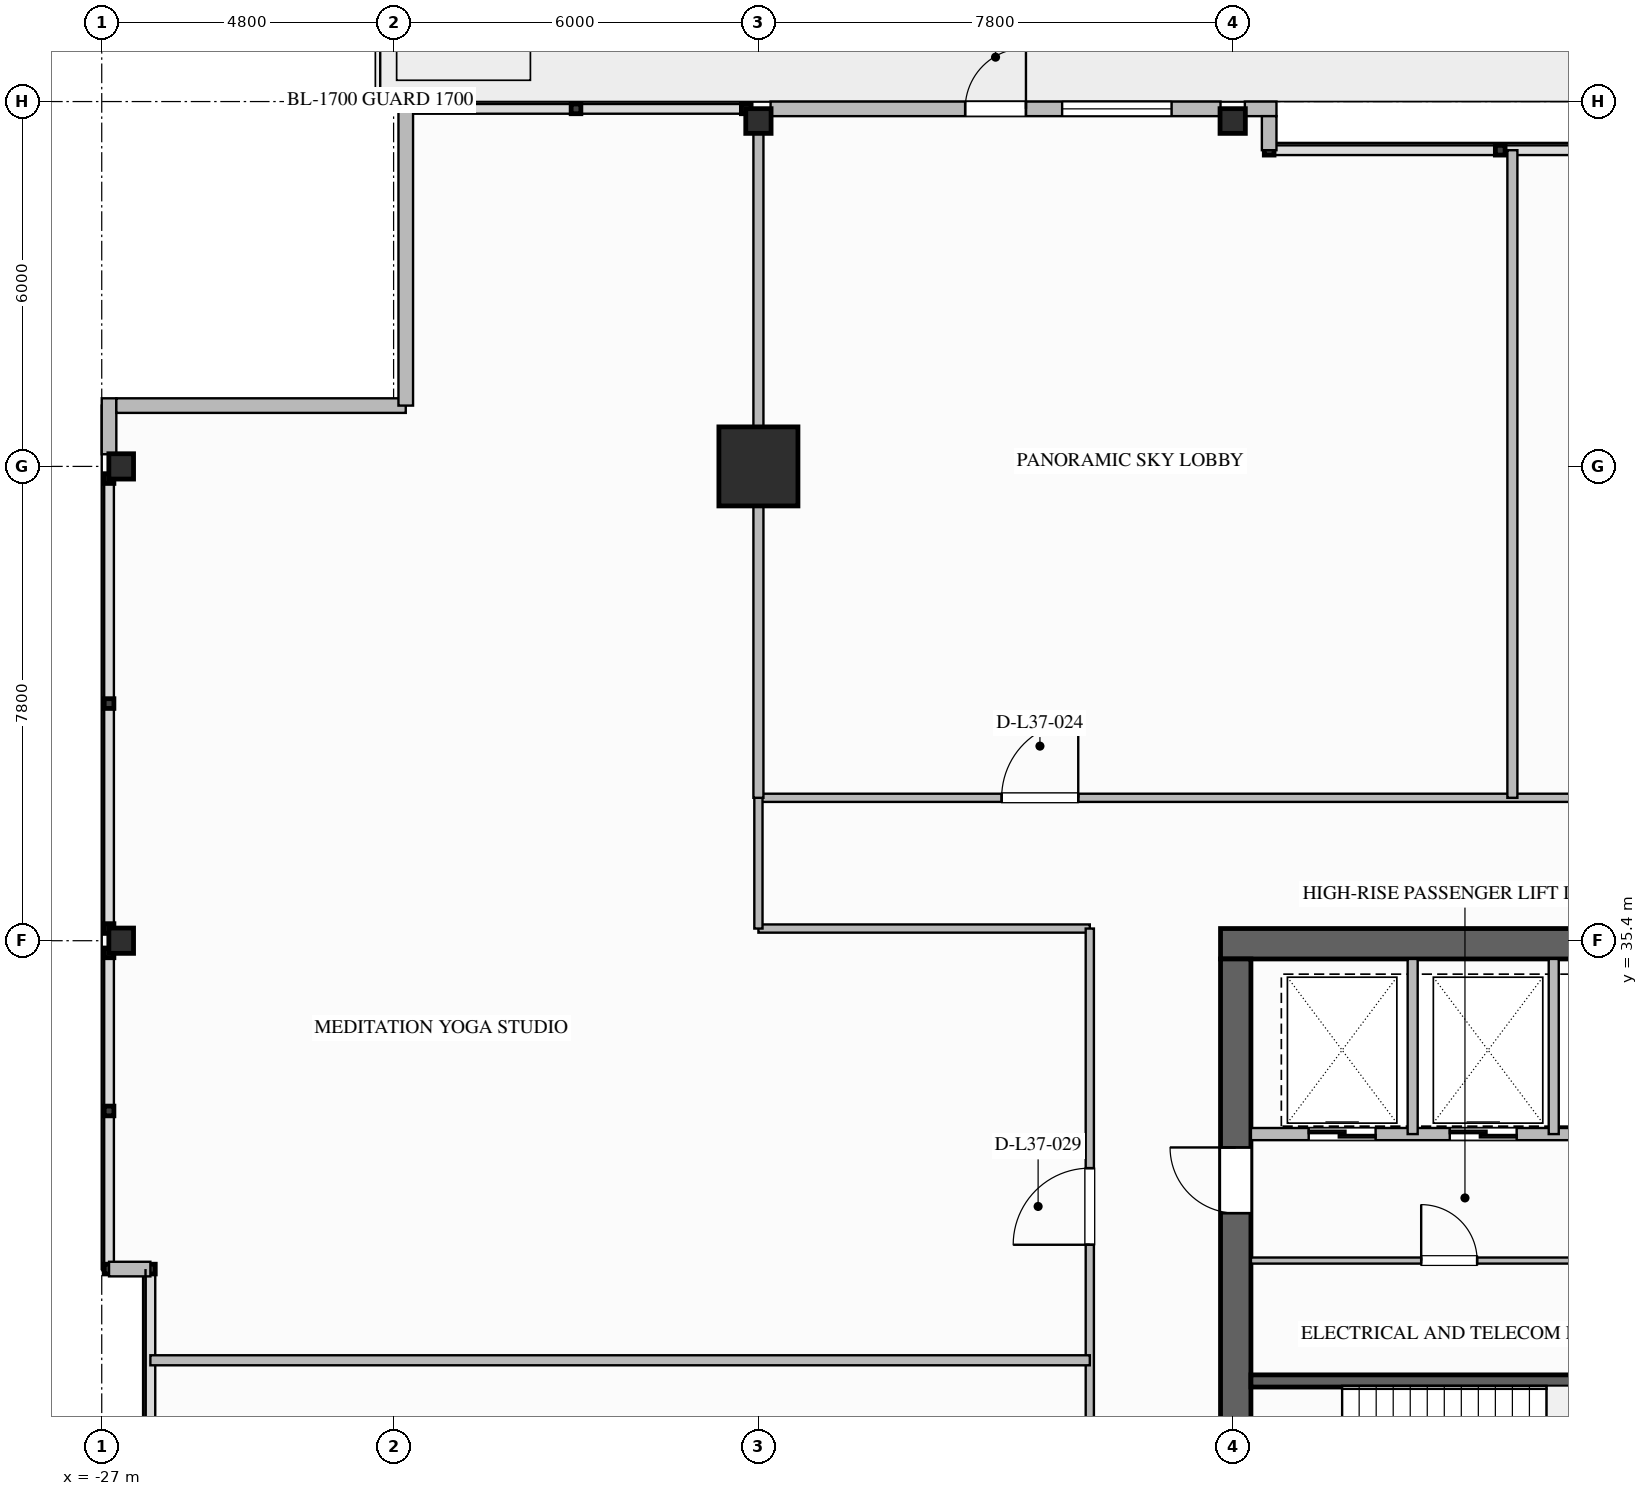
"""IFC4 building model, lengths in metres.
Left out: names, types, materials, properties, quantities, classifications, styles, units other than length and angle.
Written with IfcOpenShell. Run it as: python <this file> out.ifc"""

import sys

from ifc_helpers import new_model, si_unit, direction, frame, frame_2d, origin, origin_2d, place, context, subcontext, project, spatial, rectangle, i_section, extrude, element, fill, save


model = new_model("IFC4")
c1 = context("Model", 3, precision=1e-05, world=origin(), true_north=direction((0.0, 1.0)))
c2 = subcontext(c1, "Body", "Model", "MODEL_VIEW")
j1 = project(units=[si_unit("LENGTHUNIT", "METRE"), si_unit("PLANEANGLEUNIT", "RADIAN")], contexts=[c1])
p1 = place(None, origin())
s1 = spatial("IfcSite", under=j1, at=p1, CompositionType="ELEMENT")
p2 = place(p1, origin())
s2 = spatial("IfcBuilding", under=s1, at=p2, CompositionType="ELEMENT")
p3 = place(p2, frame((0.0, 0.0, 145.8)))
s3 = spatial("IfcBuildingStorey", under=s2, at=p3, CompositionType="ELEMENT", Elevation=145.8)
p4 = place(p3, frame((-8.6, 35.35, 0.0), z_axis=(0.0, 0.0, 1.0), x_axis=(1.0, 0.0, 0.0)))
e1 = element("IfcWall", 1, at=p4, inside=s3, PredefinedType="SHEAR", context=c2, shape_type="SweptSolid", body=[
    extrude(rectangle(XDim=17.2, YDim=0.5, at=frame_2d((8.6, 0.0))), origin(), (0.0, 0.0, 1.0), 4.6),
])
p5 = place(p3, frame((-8.35, 18.9, 0.0), z_axis=(0.0, 0.0, 1.0), x_axis=(0.0, 1.0, 0.0)))
e2 = element("IfcWall", 2, at=p5, inside=s3, PredefinedType="SHEAR", context=c2, shape_type="SweptSolid", body=[
    extrude(rectangle(XDim=16.2, YDim=0.5, at=frame_2d((8.1, 0.0))), origin(), (0.0, 0.0, 1.0), 4.6),
])
p6 = place(p5, frame((12.02, 0.0, 0.0)))
e3 = element("IfcOpeningElement", 3, at=p6, cuts=e2, PredefinedType="OPENING", context=c2, shape_type="SweptSolid", body=[
    extrude(rectangle(XDim=1.08, YDim=2.04, at=frame_2d((0.54, 1.02))), frame((0.0, 0.26, 0.0), z_axis=(0.0, -1.0, 0.0), x_axis=(1.0, 0.0, 0.0)), (0.0, 0.0, 1.0), 0.52),
])
p7 = place(p5, frame((4.5, 0.0, 0.0)))
e4 = element("IfcOpeningElement", 4, at=p7, cuts=e2, PredefinedType="OPENING", context=c2, shape_type="SweptSolid", body=[
    extrude(rectangle(XDim=1.08, YDim=2.04, at=frame_2d((0.54, 1.02))), frame((0.0, 0.26, 0.0), z_axis=(0.0, -1.0, 0.0), x_axis=(1.0, 0.0, 0.0)), (0.0, 0.0, 1.0), 0.52),
])
p8 = place(p3, frame((-16.2, 43.2, 0.0), z_axis=(0.0, 0.0, 1.0), x_axis=(1.0, 0.0, 0.0)))
e5 = element("IfcColumn", 5, at=p8, inside=s3, PredefinedType="COLUMN", context=c2, shape_type="SweptSolid", body=[
    extrude(rectangle(XDim=1.3, YDim=1.3, at=origin_2d()), origin(), (0.0, 0.0, 1.0), 4.6),
])
for number, where, z_axis, x_axis in (
    (6, (-26.68, 35.4, 0.0), (0.0, 0.0, 1.0), (1.0, 0.0, 0.0)),
    (7, (-26.68, 43.2, 0.0), (0.0, 0.0, 1.0), (1.0, 0.0, 0.0)),
):
    element("IfcColumn", number, at=place(p3, frame(where, z_axis=z_axis, x_axis=x_axis)), inside=s3, PredefinedType="COLUMN", context=c2, shape_type="SweptSolid", body=[
        extrude(i_section(OverallWidth=0.406, OverallDepth=0.416, WebThickness=0.03, FlangeThickness=0.048, FilletRadius=0.028, at=origin_2d()), origin(), (0.0, 0.0, 1.0), 4.597),
    ])
for number, where, z_axis, x_axis in (
    (8, (-16.2, 48.88, -0.3), (0.0, 0.0, 1.0), (0.0, 1.0, 0.0)),
    (9, (-8.4, 48.88, -0.3), (0.0, 0.0, 1.0), (0.0, 1.0, 0.0)),
):
    element("IfcColumn", number, at=place(p3, frame(where, z_axis=z_axis, x_axis=x_axis)), inside=s3, PredefinedType="COLUMN", context=c2, shape_type="SweptSolid", body=[
        extrude(i_section(OverallWidth=0.406, OverallDepth=0.416, WebThickness=0.03, FlangeThickness=0.048, FilletRadius=0.028, at=origin_2d()), origin(), (0.0, 0.0, 1.0), 4.897),
    ])
p9 = place(p3, frame((-26.88, 43.4, 0.0), z_axis=(0.0, 0.0, 1.0), x_axis=(0.0, 1.0, 0.0)))
e10 = element("IfcWall", 10, at=p9, inside=s3, PredefinedType="STANDARD", context=c2, shape_type="SweptSolid", body=[
    extrude(rectangle(XDim=0.92, YDim=0.24, at=frame_2d((0.46, 0.0))), origin(), (0.0, 0.0, 1.0), 4.34),
])
p10 = place(p3, frame((-16.0, 49.08, 0.0), z_axis=(0.0, 0.0, 1.0), x_axis=(1.0, 0.0, 0.0)))
e11 = element("IfcWall", 11, at=p10, inside=s3, PredefinedType="STANDARD", context=c2, shape_type="SweptSolid", body=[
    extrude(rectangle(XDim=7.4, YDim=0.24, at=frame_2d((3.7, 0.0))), origin(), (0.0, 0.0, 1.0), 3.803),
])
p11 = place(p10, frame((3.2, 0.0, 0.0)))
e12 = element("IfcOpeningElement", 12, at=p11, cuts=e11, PredefinedType="OPENING", context=c2, shape_type="SweptSolid", body=[
    extrude(rectangle(XDim=1.0, YDim=2.2, at=frame_2d((0.5, 1.1))), frame((0.0, 0.13, 0.0), z_axis=(0.0, -1.0, 0.0), x_axis=(1.0, 0.0, 0.0)), (0.0, 0.0, 1.0), 0.26),
])
p12 = place(p10, frame((4.795, 0.0, 0.75)))
e13 = element("IfcOpeningElement", 13, at=p12, cuts=e11, PredefinedType="OPENING", context=c2, shape_type="SweptSolid", body=[
    extrude(rectangle(XDim=1.8, YDim=2.05, at=frame_2d((0.9, 1.025))), frame((0.0, 0.13, 0.0), z_axis=(0.0, -1.0, 0.0), x_axis=(1.0, 0.0, 0.0)), (0.0, 0.0, 1.0), 0.26),
])
p13 = place(p3, frame((-8.2, 49.08, 0.0), z_axis=(0.0, 0.0, 1.0), x_axis=(1.0, 0.0, 0.0)))
e14 = element("IfcWall", 14, at=p13, inside=s3, PredefinedType="STANDARD", context=c2, shape_type="SweptSolid", body=[
    extrude(rectangle(XDim=0.52, YDim=0.24, at=frame_2d((0.26, 0.0))), origin(), (0.0, 0.0, 1.0), 4.34),
])
p14 = place(p3, frame((-26.76, 44.2, 0.0), z_axis=(0.0, 0.0, 1.0), x_axis=(1.0, 0.0, 0.0)))
e15 = element("IfcWall", 15, at=p14, inside=s3, PredefinedType="STANDARD", context=c2, shape_type="SweptSolid", body=[
    extrude(rectangle(XDim=4.76, YDim=0.24, at=frame_2d((2.38, 0.0))), origin(), (0.0, 0.0, 1.0), 4.34),
])
p15 = place(p3, frame((-22.0, 44.2, 0.0), z_axis=(0.0, 0.0, 1.0), x_axis=(0.0, 1.0, 0.0)))
e16 = element("IfcWall", 16, at=p15, inside=s3, PredefinedType="STANDARD", context=c2, shape_type="SweptSolid", body=[
    extrude(rectangle(XDim=4.88, YDim=0.24, at=frame_2d((2.44, 0.0))), origin(), (0.0, 0.0, 1.0), 4.34),
])
p16 = place(p3, frame((-26.2, 30.0, 0.0), z_axis=(0.0, 0.0, 1.0), x_axis=(-1.0, 0.0, 0.0)))
e17 = element("IfcWall", 17, at=p16, inside=s3, PredefinedType="STANDARD", context=c2, shape_type="SweptSolid", body=[
    extrude(rectangle(XDim=0.68, YDim=0.24, at=frame_2d((0.34, 0.0))), origin(), (0.0, 0.0, 1.0), 4.34),
])
p17 = place(p3, frame((-7.8, 48.96, 0.0), z_axis=(0.0, 0.0, 1.0), x_axis=(0.0, -1.0, 0.0)))
e18 = element("IfcWall", 18, at=p17, inside=s3, PredefinedType="STANDARD", context=c2, shape_type="SweptSolid", body=[
    extrude(rectangle(XDim=0.56, YDim=0.24, at=frame_2d((0.28, 0.0))), origin(), (0.0, 0.0, 1.0), 4.34),
])
p18 = place(p3, frame((-8.1, 28.16, 0.0), z_axis=(0.0, 0.0, 1.0), x_axis=(1.0, 0.0, 0.0)))
e19 = element("IfcWall", 19, at=p18, inside=s3, PredefinedType="SOLIDWALL", context=c2, shape_type="SweptSolid", body=[
    extrude(rectangle(XDim=8.1, YDim=0.2, at=frame_2d((4.05, 0.0))), origin(), (0.0, 0.0, 1.0), 4.34),
])
p19 = place(p3, frame((-8.1, 32.22, 0.0), z_axis=(0.0, 0.0, 1.0), x_axis=(1.0, 0.0, 0.0)))
e20 = element("IfcWall", 20, at=p19, inside=s3, PredefinedType="SOLIDWALL", context=c2, shape_type="SweptSolid", body=[
    extrude(rectangle(XDim=7.1, YDim=0.2, at=frame_2d((3.55, 0.0))), origin(), (0.0, 0.0, 1.0), 4.34),
])
p20 = place(p19, frame((0.95, 0.0, 0.0)))
e21 = element("IfcOpeningElement", 21, at=p20, cuts=e20, PredefinedType="OPENING", context=c2, shape_type="SweptSolid", body=[
    extrude(rectangle(XDim=1.1, YDim=2.2, at=frame_2d((0.55, 1.1))), frame((0.0, 0.11, 0.0), z_axis=(0.0, -1.0, 0.0), x_axis=(1.0, 0.0, 0.0)), (0.0, 0.0, 1.0), 0.22),
])
p21 = place(p19, frame((3.27, 0.0, 0.0)))
e22 = element("IfcOpeningElement", 22, at=p21, cuts=e20, PredefinedType="OPENING", context=c2, shape_type="SweptSolid", body=[
    extrude(rectangle(XDim=1.1, YDim=2.2, at=frame_2d((0.55, 1.1))), frame((0.0, 0.11, 0.0), z_axis=(0.0, -1.0, 0.0), x_axis=(1.0, 0.0, 0.0)), (0.0, 0.0, 1.0), 0.22),
])
p22 = place(p19, frame((5.59, 0.0, 0.0)))
e23 = element("IfcOpeningElement", 23, at=p22, cuts=e20, PredefinedType="OPENING", context=c2, shape_type="SweptSolid", body=[
    extrude(rectangle(XDim=1.1, YDim=2.2, at=frame_2d((0.55, 1.1))), frame((0.0, 0.11, 0.0), z_axis=(0.0, -1.0, 0.0), x_axis=(1.0, 0.0, 0.0)), (0.0, 0.0, 1.0), 0.22),
])
for number, where, z_axis, x_axis in (
    (24, (-5.44, 32.22, 0.0), (0.0, 0.0, 1.0), (0.0, 1.0, 0.0)),
    (25, (-3.12, 32.22, 0.0), (0.0, 0.0, 1.0), (0.0, 1.0, 0.0)),
):
    element("IfcWall", number, at=place(p3, frame(where, z_axis=z_axis, x_axis=x_axis)), inside=s3, PredefinedType="PARTITIONING", context=c2, shape_type="SweptSolid", body=[
        extrude(rectangle(XDim=2.88, YDim=0.165, at=frame_2d((1.44, 0.0))), origin(), (0.0, 0.0, 1.0), 4.34),
    ])
p23 = place(p3, frame((-8.1, 30.14, 0.0), z_axis=(0.0, 0.0, 1.0), x_axis=(1.0, 0.0, 0.0)))
e26 = element("IfcWall", 26, at=p23, inside=s3, PredefinedType="PARTITIONING", context=c2, shape_type="SweptSolid", body=[
    extrude(rectangle(XDim=7.1, YDim=0.1, at=frame_2d((3.55, 0.0))), origin(), (0.0, 0.0, 1.0), 4.34),
])
p24 = place(p23, frame((2.8, 0.0, 0.0)))
e27 = element("IfcOpeningElement", 27, at=p24, cuts=e26, PredefinedType="OPENING", context=c2, shape_type="SweptSolid", body=[
    extrude(rectangle(XDim=0.92, YDim=2.1, at=frame_2d((0.46, 1.05))), frame((0.0, 0.06, 0.0), z_axis=(0.0, -1.0, 0.0), x_axis=(1.0, 0.0, 0.0)), (0.0, 0.0, 1.0), 0.12),
])
p25 = place(p3, frame((-16.2, 37.75, 0.0), z_axis=(0.0, 0.0, 1.0), x_axis=(1.0, 0.0, 0.0)))
e28 = element("IfcWall", 28, at=p25, inside=s3, PredefinedType="PARTITIONING", context=c2, shape_type="SweptSolid", body=[
    extrude(rectangle(XDim=32.4, YDim=0.135, at=frame_2d((16.2, 0.0))), origin(), (0.0, 0.0, 1.0), 4.34),
])
p26 = place(p25, frame((4.0, 0.0, 0.0)))
e29 = element("IfcOpeningElement", 29, at=p26, cuts=e28, PredefinedType="OPENING", context=c2, shape_type="SweptSolid", body=[
    extrude(rectangle(XDim=1.26, YDim=2.2, at=frame_2d((0.63, 1.1))), frame((0.0, 0.077, 0.0), z_axis=(0.0, -1.0, 0.0), x_axis=(1.0, 0.0, 0.0)), (0.0, 0.0, 1.0), 0.155),
])
p27 = place(p25, frame((14.9, 0.0, 0.0)))
e30 = element("IfcOpeningElement", 30, at=p27, cuts=e28, PredefinedType="OPENING", context=c2, shape_type="SweptSolid", body=[
    extrude(rectangle(XDim=1.26, YDim=2.2, at=frame_2d((0.63, 1.1))), frame((0.0, 0.077, 0.0), z_axis=(0.0, -1.0, 0.0), x_axis=(1.0, 0.0, 0.0)), (0.0, 0.0, 1.0), 0.155),
])
p28 = place(p25, frame((25.5, 0.0, 0.0)))
e31 = element("IfcOpeningElement", 31, at=p28, cuts=e28, PredefinedType="OPENING", context=c2, shape_type="SweptSolid", body=[
    extrude(rectangle(XDim=0.92, YDim=2.1, at=frame_2d((0.46, 1.05))), frame((0.0, 0.077, 0.0), z_axis=(0.0, -1.0, 0.0), x_axis=(1.0, 0.0, 0.0)), (0.0, 0.0, 1.0), 0.155),
])
p29 = place(p25, frame((29.7, 0.0, 0.0)))
e32 = element("IfcOpeningElement", 32, at=p29, cuts=e28, PredefinedType="OPENING", context=c2, shape_type="SweptSolid", body=[
    extrude(rectangle(XDim=0.98, YDim=2.1, at=frame_2d((0.49, 1.05))), frame((0.0, 0.077, 0.0), z_axis=(0.0, -1.0, 0.0), x_axis=(1.0, 0.0, 0.0)), (0.0, 0.0, 1.0), 0.155),
])
p30 = place(p3, frame((-16.2, 35.6, 0.0), z_axis=(0.0, 0.0, 1.0), x_axis=(1.0, 0.0, 0.0)))
e33 = element("IfcWall", 33, at=p30, inside=s3, PredefinedType="PARTITIONING", context=c2, shape_type="SweptSolid", body=[
    extrude(rectangle(XDim=5.45, YDim=0.135, at=frame_2d((2.725, 0.0))), origin(), (0.0, 0.0, 1.0), 3.717),
])
p31 = place(p3, frame((-10.75, 18.4, 0.0), z_axis=(0.0, 0.0, 1.0), x_axis=(0.0, 1.0, 0.0)))
e34 = element("IfcWall", 34, at=p31, inside=s3, PredefinedType="PARTITIONING", context=c2, shape_type="SweptSolid", body=[
    extrude(rectangle(XDim=17.2, YDim=0.135, at=frame_2d((8.6, 0.0))), origin(), (0.0, 0.0, 1.0), 4.34),
])
p32 = place(p31, frame((2.5, 0.0, 0.0)))
e35 = element("IfcOpeningElement", 35, at=p32, cuts=e34, PredefinedType="OPENING", context=c2, shape_type="SweptSolid", body=[
    extrude(rectangle(XDim=1.26, YDim=2.2, at=frame_2d((0.63, 1.1))), frame((0.0, 0.077, 0.0), z_axis=(0.0, -1.0, 0.0), x_axis=(1.0, 0.0, 0.0)), (0.0, 0.0, 1.0), 0.155),
])
p33 = place(p31, frame((12.0, 0.0, 0.0)))
e36 = element("IfcOpeningElement", 36, at=p33, cuts=e34, PredefinedType="OPENING", context=c2, shape_type="SweptSolid", body=[
    extrude(rectangle(XDim=1.26, YDim=2.2, at=frame_2d((0.63, 1.1))), frame((0.0, 0.077, 0.0), z_axis=(0.0, -1.0, 0.0), x_axis=(1.0, 0.0, 0.0)), (0.0, 0.0, 1.0), 0.155),
])
p34 = place(p3, frame((-16.2, 35.6, 0.0), z_axis=(0.0, 0.0, 1.0), x_axis=(0.0, 1.0, 0.0)))
e37 = element("IfcWall", 37, at=p34, inside=s3, PredefinedType="PARTITIONING", context=c2, shape_type="SweptSolid", body=[
    extrude(rectangle(XDim=2.15, YDim=0.135, at=frame_2d((1.075, 0.0))), origin(), (0.0, 0.0, 1.0), 3.629),
])
p35 = place(p3, frame((-16.2, 37.75, 0.0), z_axis=(0.0, 0.0, 1.0), x_axis=(0.0, 1.0, 0.0)))
e38 = element("IfcWall", 38, at=p35, inside=s3, PredefinedType="PARTITIONING", context=c2, shape_type="SweptSolid", body=[
    extrude(rectangle(XDim=11.33, YDim=0.165, at=frame_2d((5.665, 0.0))), origin(), (0.0, 0.0, 1.0), 3.629),
])
p36 = place(p3, frame((-3.8, 37.75, 0.0), z_axis=(0.0, 0.0, 1.0), x_axis=(0.0, 1.0, 0.0)))
e39 = element("IfcWall", 39, at=p36, inside=s3, PredefinedType="PARTITIONING", context=c2, shape_type="SweptSolid", body=[
    extrude(rectangle(XDim=10.65, YDim=0.165, at=frame_2d((5.325, 0.0))), origin(), (0.0, 0.0, 1.0), 4.34),
])
p37 = place(p3, frame((-26.2, 28.5, 0.0), z_axis=(0.0, 0.0, 1.0), x_axis=(1.0, 0.0, 0.0)))
e40 = element("IfcWall", 40, at=p37, inside=s3, PredefinedType="PARTITIONING", context=c2, shape_type="SweptSolid", body=[
    extrude(rectangle(XDim=15.45, YDim=0.165, at=frame_2d((7.725, 0.0))), origin(), (0.0, 0.0, 1.0), 4.34),
])
p38 = place(p11, origin())
e41 = element("IfcDoor", 41, at=p38, inside=s3, OperationType="SINGLE_SWING_RIGHT", PredefinedType="DOOR", context=c2, shape_type="SweptSolid", body=[
    extrude(rectangle(XDim=1.0, YDim=2.2, at=frame_2d((0.5, 1.1))), frame((0.0, 0.025, 0.0), z_axis=(0.0, -1.0, 0.0), x_axis=(1.0, 0.0, 0.0)), (0.0, 0.0, 1.0), 0.05),
])
fill(e12, e41)
p39 = place(p12, origin())
e42 = element("IfcWindow", 42, at=p39, inside=s3, PartitioningType="SINGLE_PANEL", PredefinedType="WINDOW", context=c2, shape_type="SweptSolid", body=[
    extrude(rectangle(XDim=1.8, YDim=2.05, at=frame_2d((0.9, 1.025))), frame((0.0, 0.03, 0.0), z_axis=(0.0, -1.0, 0.0), x_axis=(1.0, 0.0, 0.0)), (0.0, 0.0, 1.0), 0.06),
])
fill(e13, e42)
p40 = place(p20, origin())
e43 = element("IfcDoor", 43, at=p40, inside=s3, OperationType="SLIDING_TO_LEFT", PredefinedType="DOOR", context=c2, shape_type="SweptSolid", body=[
    extrude(rectangle(XDim=1.1, YDim=2.2, at=frame_2d((0.55, 1.1))), frame((0.0, 0.025, 0.0), z_axis=(0.0, -1.0, 0.0), x_axis=(1.0, 0.0, 0.0)), (0.0, 0.0, 1.0), 0.05),
])
fill(e21, e43)
p41 = place(p21, origin())
e44 = element("IfcDoor", 44, at=p41, inside=s3, OperationType="SLIDING_TO_LEFT", PredefinedType="DOOR", context=c2, shape_type="SweptSolid", body=[
    extrude(rectangle(XDim=1.1, YDim=2.2, at=frame_2d((0.55, 1.1))), frame((0.0, 0.025, 0.0), z_axis=(0.0, -1.0, 0.0), x_axis=(1.0, 0.0, 0.0)), (0.0, 0.0, 1.0), 0.05),
])
fill(e22, e44)
p42 = place(p6, origin())
e45 = element("IfcDoor", 45, at=p42, inside=s3, OperationType="SINGLE_SWING_RIGHT", PredefinedType="DOOR", context=c2, shape_type="SweptSolid", body=[
    extrude(rectangle(XDim=1.08, YDim=2.04, at=frame_2d((0.54, 1.02))), frame((0.0, 0.025, 0.0), z_axis=(0.0, -1.0, 0.0), x_axis=(1.0, 0.0, 0.0)), (0.0, 0.0, 1.0), 0.05),
])
fill(e3, e45)
p43 = place(p24, origin())
e46 = element("IfcDoor", 46, at=p43, inside=s3, OperationType="SINGLE_SWING_LEFT", PredefinedType="DOOR", context=c2, shape_type="SweptSolid", body=[
    extrude(rectangle(XDim=0.92, YDim=2.1, at=frame_2d((0.46, 1.05))), frame((0.0, 0.025, 0.0), z_axis=(0.0, -1.0, 0.0), x_axis=(1.0, 0.0, 0.0)), (0.0, 0.0, 1.0), 0.05),
])
fill(e27, e46)
p44 = place(p26, origin())
e47 = element("IfcDoor", 47, at=p44, inside=s3, OperationType="SINGLE_SWING_RIGHT", PredefinedType="DOOR", context=c2, shape_type="SweptSolid", body=[
    extrude(rectangle(XDim=1.26, YDim=2.2, at=frame_2d((0.63, 1.1))), frame((0.0, 0.025, 0.0), z_axis=(0.0, -1.0, 0.0), x_axis=(1.0, 0.0, 0.0)), (0.0, 0.0, 1.0), 0.05),
])
fill(e29, e47)
p45 = place(p33, origin())
e48 = element("IfcDoor", 48, at=p45, inside=s3, OperationType="SINGLE_SWING_LEFT", PredefinedType="DOOR", context=c2, shape_type="SweptSolid", body=[
    extrude(rectangle(XDim=1.26, YDim=2.2, at=frame_2d((0.63, 1.1))), frame((0.0, 0.025, 0.0), z_axis=(0.0, -1.0, 0.0), x_axis=(1.0, 0.0, 0.0)), (0.0, 0.0, 1.0), 0.05),
])
fill(e36, e48)
save(model, sys.argv[1])
